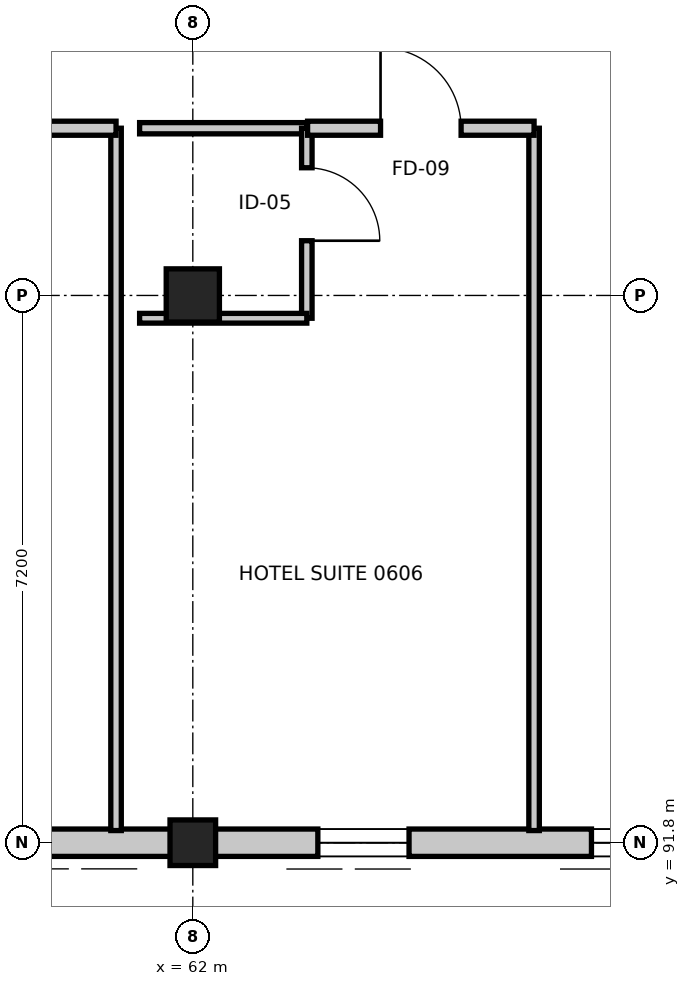
"""IFC4 building model, lengths in metres.
Left out: names, types, materials, properties, quantities, classifications, styles, units other than length and angle.
Written with IfcOpenShell. Run it as: python <this file> out.ifc"""

import sys

from ifc_helpers import new_model, si_unit, direction, frame, frame_2d, origin, origin_2d, place, context, subcontext, project, spatial, rectangle, extrude, element, fill, save


model = new_model("IFC4")
c1 = context("Model", 3, precision=1e-05, world=origin(), true_north=direction((0.0, 1.0)))
c2 = subcontext(c1, "Body", "Model", "MODEL_VIEW")
j1 = project(units=[si_unit("LENGTHUNIT", "METRE"), si_unit("PLANEANGLEUNIT", "RADIAN")], contexts=[c1])
p1 = place(None, origin())
s1 = spatial("IfcSite", under=j1, at=p1, CompositionType="ELEMENT")
p2 = place(p1, origin())
s2 = spatial("IfcBuilding", under=s1, at=p2, CompositionType="ELEMENT")
p3 = place(p2, frame((0.0, 0.0, 26.4)))
s3 = spatial("IfcBuildingStorey", under=s2, at=p3, CompositionType="ELEMENT", Elevation=26.4)
p4 = place(p3, frame((62.0, 91.8, 0.0), z_axis=(0.0, 0.0, 1.0), x_axis=(1.0, 0.0, 0.0)))
e1 = element("IfcColumn", 1, at=p4, inside=s3, PredefinedType="COLUMN", context=c2, shape_type="SweptSolid", body=[
    extrude(rectangle(XDim=0.6, YDim=0.6, at=origin_2d()), origin(), (0.0, 0.0, 1.0), 3.6),
])
p5 = place(p3, frame((62.0, 99.0, 0.0), z_axis=(0.0, 0.0, 1.0), x_axis=(1.0, 0.0, 0.0)))
e2 = element("IfcColumn", 2, at=p5, inside=s3, PredefinedType="COLUMN", context=c2, shape_type="SweptSolid", body=[
    extrude(rectangle(XDim=0.7, YDim=0.7, at=origin_2d()), origin(), (0.0, 0.0, 1.0), 3.6),
])
p6 = place(p3, frame((69.2, 91.8, 0.0), z_axis=(0.0, 0.0, 1.0), x_axis=(-1.0, 0.0, 0.0)))
e3 = element("IfcWall", 3, at=p6, inside=s3, PredefinedType="STANDARD", context=c2, shape_type="SweptSolid", body=[
    extrude(rectangle(XDim=7.2, YDim=0.36, at=frame_2d((3.6, 0.0))), origin(), (0.0, 0.0, 1.0), 2.735),
])
p7 = place(p6, frame((0.755, 0.0, 0.75)))
e4 = element("IfcOpeningElement", 4, at=p7, cuts=e3, PredefinedType="OPENING", context=c2, shape_type="SweptSolid", body=[
    extrude(rectangle(XDim=1.2, YDim=1.5, at=frame_2d((0.6, 0.75))), frame((0.0, 0.19, 0.0), z_axis=(0.0, -1.0, 0.0), x_axis=(1.0, 0.0, 0.0)), (0.0, 0.0, 1.0), 0.38),
])
p8 = place(p6, frame((4.355, 0.0, 0.75)))
e5 = element("IfcOpeningElement", 5, at=p8, cuts=e3, PredefinedType="OPENING", context=c2, shape_type="SweptSolid", body=[
    extrude(rectangle(XDim=1.2, YDim=1.5, at=frame_2d((0.6, 0.75))), frame((0.0, 0.19, 0.0), z_axis=(0.0, -1.0, 0.0), x_axis=(1.0, 0.0, 0.0)), (0.0, 0.0, 1.0), 0.38),
])
p9 = place(p3, frame((62.0, 91.8, 0.0), z_axis=(0.0, 0.0, 1.0), x_axis=(-1.0, 0.0, 0.0)))
e6 = element("IfcWall", 6, at=p9, inside=s3, PredefinedType="STANDARD", context=c2, shape_type="SweptSolid", body=[
    extrude(rectangle(XDim=7.2, YDim=0.36, at=frame_2d((3.6, 0.0))), origin(), (0.0, 0.0, 1.0), 2.735),
])
p10 = place(p9, frame((2.85, 0.0, 0.75)))
e7 = element("IfcOpeningElement", 7, at=p10, cuts=e6, PredefinedType="OPENING", context=c2, shape_type="SweptSolid", body=[
    extrude(rectangle(XDim=1.5, YDim=1.5, at=frame_2d((0.75, 0.75))), frame((0.0, 0.19, 0.0), z_axis=(0.0, -1.0, 0.0), x_axis=(1.0, 0.0, 0.0)), (0.0, 0.0, 1.0), 0.38),
])
p11 = place(p3, frame((60.99, 101.2, 0.0), z_axis=(0.0, 0.0, 1.0), x_axis=(0.0, -1.0, 0.0)))
e8 = element("IfcWall", 8, at=p11, inside=s3, PredefinedType="PARTITIONING", context=c2, shape_type="SweptSolid", body=[
    extrude(rectangle(XDim=9.24, YDim=0.138, at=frame_2d((4.62, 0.0))), origin(), (0.0, 0.0, 1.0), 2.735),
])
p12 = place(p3, frame((58.01, 101.2, 0.0), z_axis=(0.0, 0.0, 1.0), x_axis=(1.0, 0.0, 0.0)))
e9 = element("IfcWall", 9, at=p12, inside=s3, PredefinedType="PARTITIONING", context=c2, shape_type="SweptSolid", body=[
    extrude(rectangle(XDim=2.98, YDim=0.185, at=frame_2d((1.49, 0.0))), origin(), (0.0, 0.0, 1.0), 3.35),
])
p13 = place(p12, frame((1.0, 0.0, 0.0)))
e10 = element("IfcOpeningElement", 10, at=p13, cuts=e9, PredefinedType="OPENING", context=c2, shape_type="SweptSolid", body=[
    extrude(rectangle(XDim=0.98, YDim=2.15, at=frame_2d((0.49, 1.075))), frame((0.0, 0.103, 0.0), z_axis=(0.0, -1.0, 0.0), x_axis=(1.0, 0.0, 0.0)), (0.0, 0.0, 1.0), 0.205),
])
p14 = place(p3, frame((61.3, 101.2, 0.0), z_axis=(0.0, 0.0, 1.0), x_axis=(1.0, 0.0, 0.0)))
e11 = element("IfcWall", 11, at=p14, inside=s3, PredefinedType="PARTITIONING", context=c2, shape_type="SweptSolid", body=[
    extrude(rectangle(XDim=2.2, YDim=0.148, at=frame_2d((1.1, 0.0))), origin(), (0.0, 0.0, 1.0), 2.685),
])
p15 = place(p3, frame((63.5, 101.2, 0.0), z_axis=(0.0, 0.0, 1.0), x_axis=(0.0, -1.0, 0.0)))
e12 = element("IfcWall", 12, at=p15, inside=s3, PredefinedType="PARTITIONING", context=c2, shape_type="SweptSolid", body=[
    extrude(rectangle(XDim=2.5, YDim=0.138, at=frame_2d((1.25, 0.0))), origin(), (0.0, 0.0, 1.0), 2.735),
])
p16 = place(p15, frame((0.52, 0.0, 0.0)))
e13 = element("IfcOpeningElement", 13, at=p16, cuts=e12, PredefinedType="OPENING", context=c2, shape_type="SweptSolid", body=[
    extrude(rectangle(XDim=0.96, YDim=2.14, at=frame_2d((0.48, 1.07))), frame((0.0, 0.079, 0.0), z_axis=(0.0, -1.0, 0.0), x_axis=(1.0, 0.0, 0.0)), (0.0, 0.0, 1.0), 0.158),
])
p17 = place(p3, frame((63.5, 98.7, 0.0), z_axis=(0.0, 0.0, 1.0), x_axis=(-1.0, 0.0, 0.0)))
e14 = element("IfcWall", 14, at=p17, inside=s3, PredefinedType="PARTITIONING", context=c2, shape_type="SweptSolid", body=[
    extrude(rectangle(XDim=2.2, YDim=0.128, at=frame_2d((1.1, 0.0))), origin(), (0.0, 0.0, 1.0), 2.685),
])
p18 = place(p3, frame((66.49, 101.2, 0.0), z_axis=(0.0, 0.0, 1.0), x_axis=(0.0, -1.0, 0.0)))
e15 = element("IfcWall", 15, at=p18, inside=s3, PredefinedType="PARTITIONING", context=c2, shape_type="SweptSolid", body=[
    extrude(rectangle(XDim=9.24, YDim=0.138, at=frame_2d((4.62, 0.0))), origin(), (0.0, 0.0, 1.0), 2.735),
])
p19 = place(p3, frame((63.51, 101.2, 0.0), z_axis=(0.0, 0.0, 1.0), x_axis=(1.0, 0.0, 0.0)))
e16 = element("IfcWall", 16, at=p19, inside=s3, PredefinedType="PARTITIONING", context=c2, shape_type="SweptSolid", body=[
    extrude(rectangle(XDim=2.98, YDim=0.185, at=frame_2d((1.49, 0.0))), origin(), (0.0, 0.0, 1.0), 3.35),
])
p20 = place(p19, frame((0.96, 0.0, 0.0)))
e17 = element("IfcOpeningElement", 17, at=p20, cuts=e16, PredefinedType="OPENING", context=c2, shape_type="SweptSolid", body=[
    extrude(rectangle(XDim=1.06, YDim=2.2, at=frame_2d((0.53, 1.1))), frame((0.0, 0.103, 0.0), z_axis=(0.0, -1.0, 0.0), x_axis=(1.0, 0.0, 0.0)), (0.0, 0.0, 1.0), 0.205),
])
p21 = place(p7, origin())
e18 = element("IfcWindow", 18, at=p21, inside=s3, PartitioningType="SINGLE_PANEL", PredefinedType="WINDOW", context=c2, shape_type="SweptSolid", body=[
    extrude(rectangle(XDim=1.2, YDim=1.5, at=frame_2d((0.6, 0.75))), frame((0.0, 0.03, 0.0), z_axis=(0.0, -1.0, 0.0), x_axis=(1.0, 0.0, 0.0)), (0.0, 0.0, 1.0), 0.06),
])
fill(e4, e18)
p22 = place(p16, origin())
e19 = element("IfcDoor", 19, at=p22, inside=s3, OperationType="SINGLE_SWING_RIGHT", PredefinedType="DOOR", context=c2, shape_type="SweptSolid", body=[
    extrude(rectangle(XDim=0.96, YDim=2.14, at=frame_2d((0.48, 1.07))), frame((0.0, 0.025, 0.0), z_axis=(0.0, -1.0, 0.0), x_axis=(1.0, 0.0, 0.0)), (0.0, 0.0, 1.0), 0.05),
])
fill(e13, e19)
p23 = place(p20, origin())
e20 = element("IfcDoor", 20, at=p23, inside=s3, OperationType="SINGLE_SWING_LEFT", PredefinedType="DOOR", context=c2, shape_type="SweptSolid", body=[
    extrude(rectangle(XDim=1.06, YDim=2.2, at=frame_2d((0.53, 1.1))), frame((0.0, 0.025, 0.0), z_axis=(0.0, -1.0, 0.0), x_axis=(1.0, 0.0, 0.0)), (0.0, 0.0, 1.0), 0.05),
])
fill(e17, e20)
p24 = place(p8, origin())
e21 = element("IfcWindow", 21, at=p24, inside=s3, PartitioningType="SINGLE_PANEL", PredefinedType="WINDOW", context=c2, shape_type="SweptSolid", body=[
    extrude(rectangle(XDim=1.2, YDim=1.5, at=frame_2d((0.6, 0.75))), frame((0.0, 0.03, 0.0), z_axis=(0.0, -1.0, 0.0), x_axis=(1.0, 0.0, 0.0)), (0.0, 0.0, 1.0), 0.06),
])
fill(e5, e21)
save(model, sys.argv[1])
